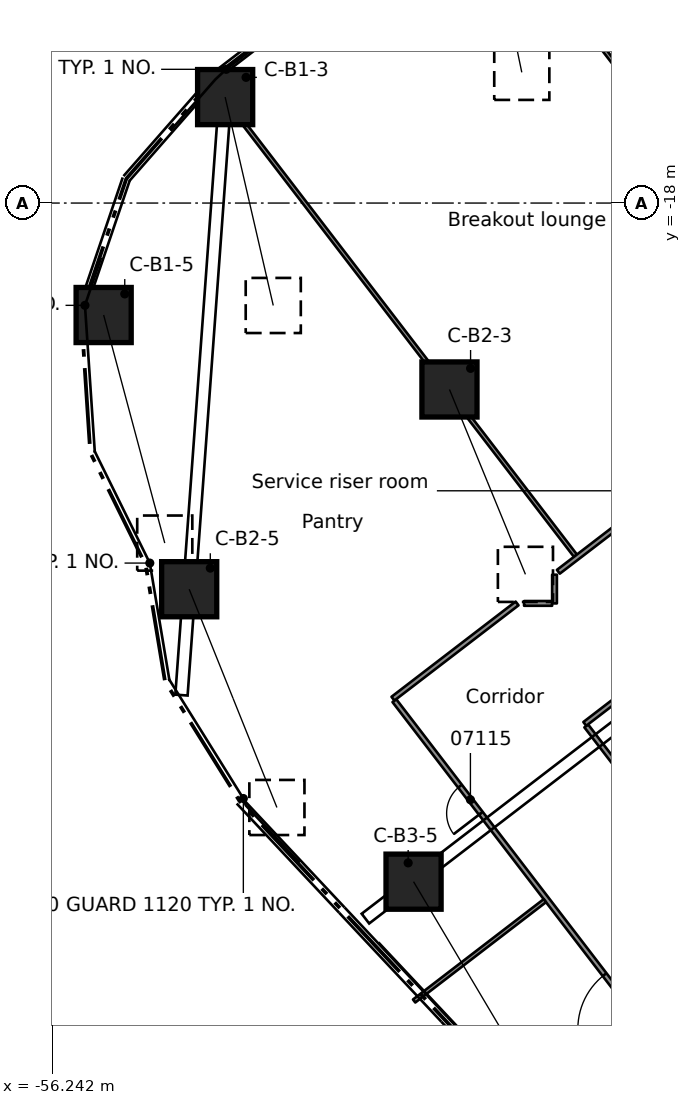
"""IFC4 building model, lengths in metres.
Left out: names, types, materials, properties, quantities, classifications, styles, units other than length and angle.
Written with IfcOpenShell. Run it as: python <this file> out.ifc"""

import sys

from ifc_helpers import new_model, si_unit, direction, frame, frame_2d, origin, origin_2d, place, context, subcontext, project, spatial, rectangle, extrude, element, fill, save


model = new_model("IFC4")
c1 = context("Model", 3, precision=1e-05, world=origin(), true_north=direction((0.0, 1.0)))
c2 = subcontext(c1, "Body", "Model", "MODEL_VIEW")
j1 = project(units=[si_unit("LENGTHUNIT", "METRE"), si_unit("PLANEANGLEUNIT", "RADIAN")], contexts=[c1])
p1 = place(None, origin())
s1 = spatial("IfcSite", under=j1, at=p1, CompositionType="ELEMENT")
p2 = place(p1, origin())
s2 = spatial("IfcBuilding", under=s1, at=p2, CompositionType="ELEMENT")
p3 = place(p2, frame((0.0, 0.0, 33.3)))
s3 = spatial("IfcBuildingStorey", under=s2, at=p3, CompositionType="ELEMENT", Elevation=33.3)
p4 = place(p3, frame((-44.84, -9.954, 0.626), z_axis=(0.175985891109, -0.845431202961, 0.504256925773), x_axis=(0.979014073613, 0.20379264871, 0.0)))
e1 = element("IfcColumn", 1, at=p4, inside=s3, PredefinedType="COLUMN", context=c2, shape_type="SweptSolid", body=[
    extrude(rectangle(XDim=1.45, YDim=1.45, at=origin_2d()), origin(), (0.0, 0.0, 1.0), 5.449),
])
p5 = place(p3, frame((-51.687, -15.212, 0.654), z_axis=(0.20296345223, -0.878973423379, 0.431522372598), x_axis=(0.974361208205, 0.224989412964, 0.0)))
e2 = element("IfcColumn", 2, at=p5, inside=s3, PredefinedType="COLUMN", context=c2, shape_type="SweptSolid", body=[
    extrude(rectangle(XDim=1.45, YDim=1.45, at=origin_2d()), origin(), (0.0, 0.0, 1.0), 6.238),
])
p6 = place(p3, frame((-54.884, -20.946, 0.666), z_axis=(0.237851709207, -0.887565661499, 0.394529797296), x_axis=(0.965917879508, 0.258848701071, 0.0)))
e3 = element("IfcColumn", 3, at=p6, inside=s3, PredefinedType="COLUMN", context=c2, shape_type="SweptSolid", body=[
    extrude(rectangle(XDim=1.45, YDim=1.45, at=origin_2d()), origin(), (0.0, 0.0, 1.0), 6.761),
])
p7 = place(p3, frame((-45.784, -22.905, 0.644), z_axis=(0.337825549268, -0.822160444585, 0.45817693266), x_axis=(0.924959508437, 0.380065662422, 0.0)))
e4 = element("IfcColumn", 4, at=p7, inside=s3, PredefinedType="COLUMN", context=c2, shape_type="SweptSolid", body=[
    extrude(rectangle(XDim=1.45, YDim=1.45, at=origin_2d()), origin(), (0.0, 0.0, 1.0), 5.917),
])
p8 = place(p3, frame((-52.633, -28.161, 0.666), z_axis=(0.342432498317, -0.852060724604, 0.395894563846), x_axis=(0.927871568112, 0.372899923692, 0.0)))
e5 = element("IfcColumn", 5, at=p8, inside=s3, PredefinedType="COLUMN", context=c2, shape_type="SweptSolid", body=[
    extrude(rectangle(XDim=1.45, YDim=1.45, at=origin_2d()), origin(), (0.0, 0.0, 1.0), 6.74),
])
p9 = place(p3, frame((-46.729, -35.856, 0.661), z_axis=(0.465465031922, -0.78439754496, 0.409954626171), x_axis=(0.859985150882, 0.510319057319, 0.0)))
e6 = element("IfcColumn", 6, at=p9, inside=s3, PredefinedType="COLUMN", context=c2, shape_type="SweptSolid", body=[
    extrude(rectangle(XDim=1.45, YDim=1.45, at=origin_2d()), origin(), (0.0, 0.0, 1.0), 6.531),
])
p10 = place(p3, frame((-39.218, -41.54, 0.0), z_axis=(0.0, 0.0, 1.0), x_axis=(-0.608705901591, 0.79339594489, 0.0)))
e7 = element("IfcWall", 7, at=p10, inside=s3, PredefinedType="PARTITIONING", context=c2, shape_type="SweptSolid", body=[
    extrude(rectangle(XDim=13.169, YDim=0.125, at=frame_2d((6.584, 0.0))), origin(), (0.0, 0.0, 1.0), 3.56),
])
p11 = place(p10, frame((2.281, 0.0, 0.0)))
e8 = element("IfcOpeningElement", 8, at=p11, cuts=e7, PredefinedType="OPENING", context=c2, shape_type="SweptSolid", body=[
    extrude(rectangle(XDim=1.8, YDim=2.1, at=frame_2d((0.9, 1.05))), frame((0.0, 0.073, 0.0), z_axis=(0.0, -1.0, 0.0), x_axis=(1.0, 0.0, 0.0)), (0.0, 0.0, 1.0), 0.145),
])
p12 = place(p10, frame((9.431, 0.0, 0.0)))
e9 = element("IfcOpeningElement", 9, at=p12, cuts=e7, PredefinedType="OPENING", context=c2, shape_type="SweptSolid", body=[
    extrude(rectangle(XDim=0.9, YDim=2.1, at=frame_2d((0.45, 1.05))), frame((0.0, 0.073, 0.0), z_axis=(0.0, -1.0, 0.0), x_axis=(1.0, 0.0, 0.0)), (0.0, 0.0, 1.0), 0.145),
])
p13 = place(p3, frame((-42.185, -31.757, 0.0), z_axis=(0.0, 0.0, 1.0), x_axis=(0.608799639809, -0.793324018651, 0.0)))
e10 = element("IfcWall", 10, at=p13, inside=s3, PredefinedType="PARTITIONING", context=c2, shape_type="SweptSolid", body=[
    extrude(rectangle(XDim=5.972, YDim=0.125, at=frame_2d((2.986, 0.0))), origin(), (0.0, 0.0, 1.0), 3.56),
])
p14 = place(p3, frame((-52.2, -14.599, 0.0), z_axis=(0.0, 0.0, 1.0), x_axis=(0.608803805545, -0.793320821833, 0.0)))
e11 = element("IfcWall", 11, at=p14, inside=s3, PredefinedType="PARTITIONING", context=c2, shape_type="SweptSolid", body=[
    extrude(rectangle(XDim=15.982, YDim=0.1, at=frame_2d((7.991, 0.0))), origin(), (0.0, 0.0, 1.0), 3.56),
])
p15 = place(p3, frame((-45.331, -9.259, 0.0), z_axis=(0.0, 0.0, 1.0), x_axis=(0.608773776811, -0.793343865337, 0.0)))
e12 = element("IfcWall", 12, at=p15, inside=s3, PredefinedType="PARTITIONING", context=c2, shape_type="SweptSolid", body=[
    extrude(rectangle(XDim=16.037, YDim=0.1, at=frame_2d((8.019, 0.0))), origin(), (0.0, 0.0, 1.0), 3.56),
])
p16 = place(p3, frame((-43.821, -28.534, 0.0), z_axis=(0.0, 0.0, 1.0), x_axis=(1.0, 0.0, 0.0)))
e13 = element("IfcWall", 13, at=p16, inside=s3, PredefinedType="PARTITIONING", context=c2, shape_type="SweptSolid", body=[
    extrude(rectangle(XDim=0.738, YDim=0.125, at=frame_2d((0.369, 0.0))), origin(), (0.0, 0.0, 1.0), 3.56),
])
p17 = place(p3, frame((-46.714, -38.996, 0.0), z_axis=(0.0, 0.0, 1.0), x_axis=(0.793309958448, 0.608817961157, 0.0)))
e14 = element("IfcWall", 14, at=p17, inside=s3, PredefinedType="PARTITIONING", context=c2, shape_type="SweptSolid", body=[
    extrude(rectangle(XDim=4.336, YDim=0.1, at=frame_2d((2.168, 0.0))), origin(), (0.0, 0.0, 1.0), 3.56),
])
p18 = place(p3, frame((-42.223, -31.705, 0.0), z_axis=(0.0, 0.0, 1.0), x_axis=(0.793135510501, 0.609045205204, 0.0)))
e15 = element("IfcWall", 15, at=p18, inside=s3, PredefinedType="PARTITIONING", context=c2, shape_type="SweptSolid", body=[
    extrude(rectangle(XDim=1.862, YDim=0.125, at=frame_2d((0.931, 0.0))), origin(), (0.0, 0.0, 1.0), 3.56),
])
p19 = place(p3, frame((-44.005, -28.535, 0.0), z_axis=(0.0, 0.0, 1.0), x_axis=(-0.793449826547, -0.608635665035, 0.0)))
e16 = element("IfcWall", 16, at=p19, inside=s3, PredefinedType="PARTITIONING", context=c2, shape_type="SweptSolid", body=[
    extrude(rectangle(XDim=4.118, YDim=0.125, at=frame_2d((2.059, 0.0))), origin(), (0.0, 0.0, 1.0), 3.56),
])
p20 = place(p3, frame((-42.919, -27.702, 0.0), z_axis=(0.0, 0.0, 1.0), x_axis=(0.793470923698, 0.60860816068, 0.0)))
e17 = element("IfcWall", 17, at=p20, inside=s3, PredefinedType="PARTITIONING", context=c2, shape_type="SweptSolid", body=[
    extrude(rectangle(XDim=9.315, YDim=0.125, at=frame_2d((4.657, 0.0))), origin(), (0.0, 0.0, 1.0), 3.56),
])
p21 = place(p20, frame((3.964, 0.0, 0.0)))
e18 = element("IfcOpeningElement", 18, at=p21, cuts=e17, PredefinedType="OPENING", context=c2, shape_type="SweptSolid", body=[
    extrude(rectangle(XDim=1.8, YDim=2.1, at=frame_2d((0.9, 1.05))), frame((0.0, 0.073, 0.0), z_axis=(0.0, -1.0, 0.0), x_axis=(1.0, 0.0, 0.0)), (0.0, 0.0, 1.0), 0.145),
])
p22 = place(p3, frame((-43.02, -28.534, 0.0), z_axis=(0.0, 0.0, 1.0), x_axis=(0.0, 1.0, 0.0)))
e19 = element("IfcWall", 19, at=p22, inside=s3, PredefinedType="PARTITIONING", context=c2, shape_type="SweptSolid", body=[
    extrude(rectangle(XDim=0.755, YDim=0.125, at=frame_2d((0.377, 0.0))), origin(), (0.0, 0.0, 1.0), 3.56),
])
p23 = place(p11, origin())
e20 = element("IfcDoor", 20, at=p23, inside=s3, OperationType="DOUBLE_DOOR_SINGLE_SWING", PredefinedType="DOOR", context=c2, shape_type="SweptSolid", body=[
    extrude(rectangle(XDim=1.8, YDim=2.1, at=frame_2d((0.9, 1.05))), frame((0.0, 0.025, 0.0), z_axis=(0.0, -1.0, 0.0), x_axis=(1.0, 0.0, 0.0)), (0.0, 0.0, 1.0), 0.05),
])
fill(e8, e20)
p24 = place(p12, origin())
e21 = element("IfcDoor", 21, at=p24, inside=s3, OperationType="SINGLE_SWING_RIGHT", PredefinedType="DOOR", context=c2, shape_type="SweptSolid", body=[
    extrude(rectangle(XDim=0.9, YDim=2.1, at=frame_2d((0.45, 1.05))), frame((0.0, 0.025, 0.0), z_axis=(0.0, -1.0, 0.0), x_axis=(1.0, 0.0, 0.0)), (0.0, 0.0, 1.0), 0.05),
])
fill(e9, e21)
save(model, sys.argv[1])
